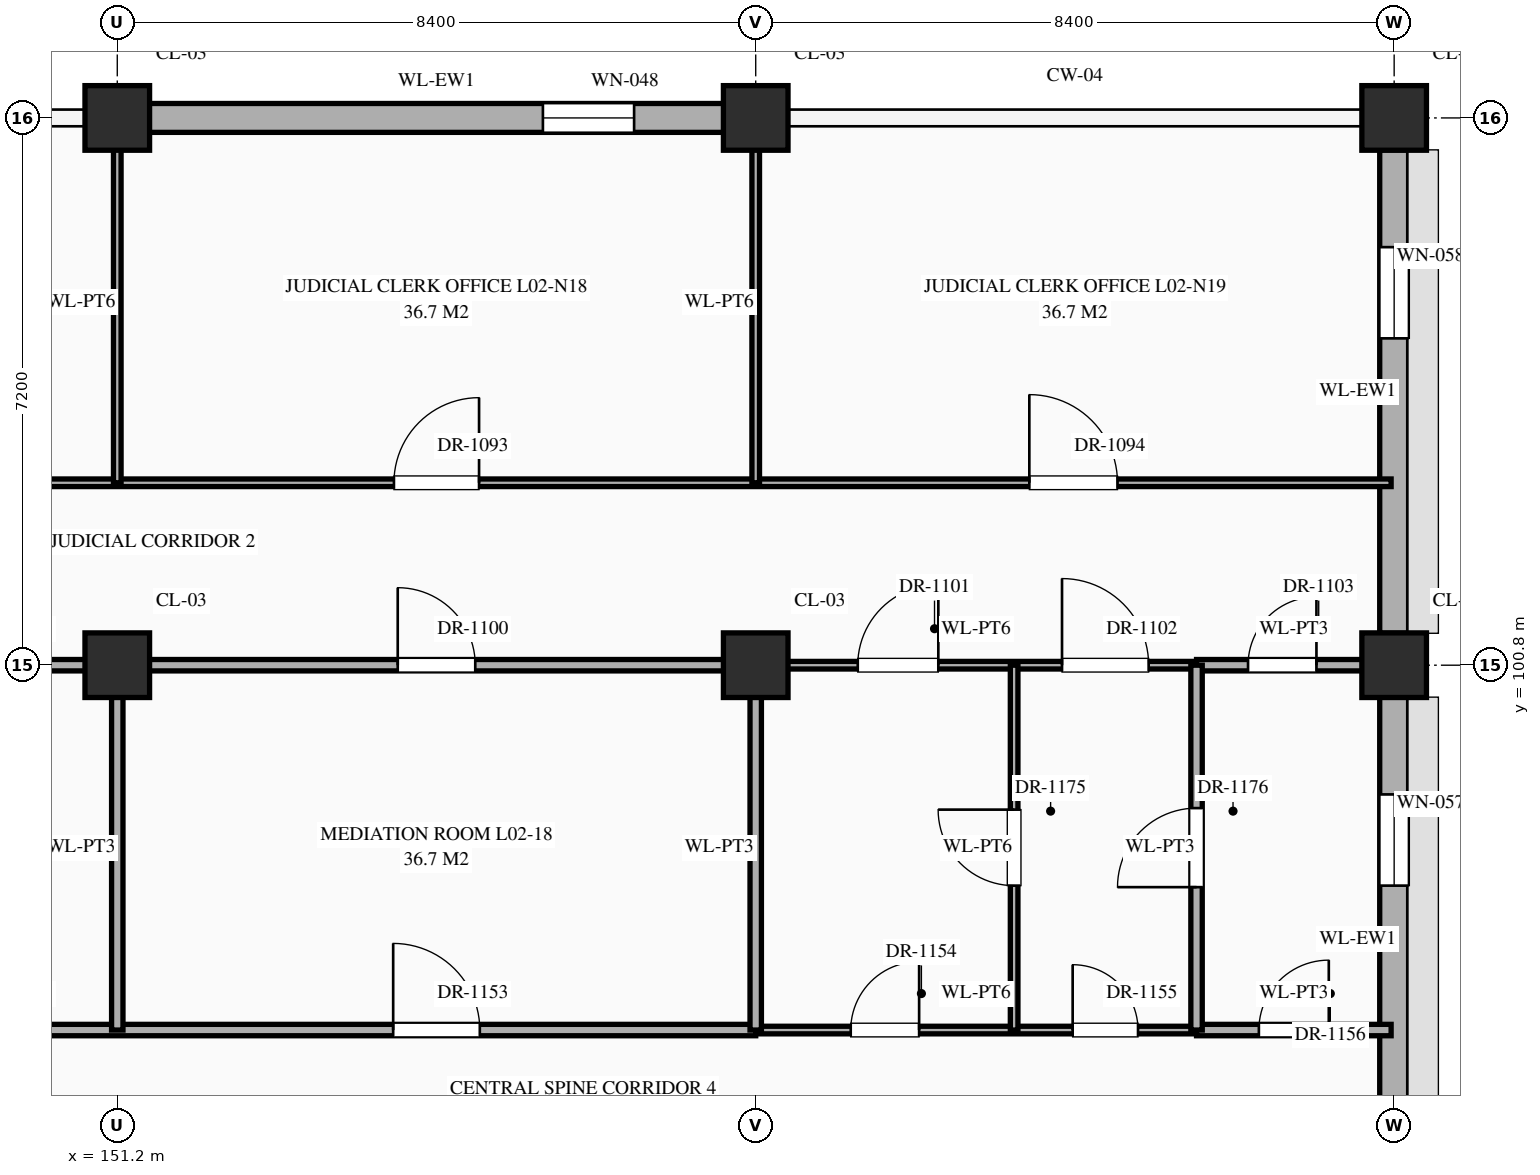
"""IFC4 building model, lengths in metres.
Left out: names, types, materials, properties, quantities, classifications, styles, units other than length and angle.
Written with IfcOpenShell. Run it as: python <this file> out.ifc"""

import sys

from ifc_helpers import new_model, si_unit, direction, frame, frame_2d, origin, origin_2d, place, context, subcontext, project, spatial, rectangle, extrude, element, fill, save


model = new_model("IFC4")
c1 = context("Model", 3, precision=1e-05, world=origin(), true_north=direction((0.0, 1.0)))
c2 = subcontext(c1, "Body", "Model", "MODEL_VIEW")
j1 = project(units=[si_unit("LENGTHUNIT", "METRE"), si_unit("PLANEANGLEUNIT", "RADIAN")], contexts=[c1])
p1 = place(None, origin())
s1 = spatial("IfcSite", under=j1, at=p1, CompositionType="ELEMENT")
p2 = place(p1, origin())
s2 = spatial("IfcBuilding", under=s1, at=p2, CompositionType="ELEMENT")
p3 = place(p2, frame((0.0, 0.0, 5.4)))
s3 = spatial("IfcBuildingStorey", under=s2, at=p3, CompositionType="ELEMENT", Elevation=5.4)
for number, where, z_axis, x_axis in (
    (1, (151.2, 100.8, 0.0), (0.0, 0.0, 1.0), (1.0, 0.0, 0.0)),
    (2, (151.2, 108.0, 0.0), (0.0, 0.0, 1.0), (1.0, 0.0, 0.0)),
    (3, (159.6, 100.8, 0.0), (0.0, 0.0, 1.0), (1.0, 0.0, 0.0)),
    (4, (159.6, 108.0, 0.0), (0.0, 0.0, 1.0), (1.0, 0.0, 0.0)),
    (5, (168.0, 100.8, 0.0), (0.0, 0.0, 1.0), (1.0, 0.0, 0.0)),
    (6, (168.0, 108.0, 0.0), (0.0, 0.0, 1.0), (1.0, 0.0, 0.0)),
):
    element("IfcColumn", number, at=place(p3, frame(where, z_axis=z_axis, x_axis=x_axis)), inside=s3, PredefinedType="COLUMN", context=c2, shape_type="SweptSolid", body=[
        extrude(rectangle(XDim=0.85, YDim=0.85, at=origin_2d()), origin(), (0.0, 0.0, 1.0), 5.4),
    ])
p4 = place(p3, frame((151.62, 108.0, 0.0), z_axis=(0.0, 0.0, 1.0), x_axis=(1.0, 0.0, 0.0)))
e7 = element("IfcWall", 7, at=p4, inside=s3, PredefinedType="STANDARD", context=c2, shape_type="SweptSolid", body=[
    extrude(rectangle(XDim=7.56, YDim=0.38, at=frame_2d((3.78, 0.0))), origin(), (0.0, 0.0, 1.0), 4.47),
])
p5 = place(p4, frame((5.18, 0.0, 0.85)))
e8 = element("IfcOpeningElement", 8, at=p5, cuts=e7, PredefinedType="OPENING", context=c2, shape_type="SweptSolid", body=[
    extrude(rectangle(XDim=1.2, YDim=1.92, at=frame_2d((0.6, 0.96))), frame((0.0, 0.202, 0.0), z_axis=(0.0, -1.0, 0.0), x_axis=(1.0, 0.0, 0.0)), (0.0, 0.0, 1.0), 0.404),
])
p6 = place(p3, frame((168.0, 94.02, 0.0), z_axis=(0.0, 0.0, 1.0), x_axis=(0.0, 1.0, 0.0)))
e9 = element("IfcWall", 9, at=p6, inside=s3, PredefinedType="STANDARD", context=c2, shape_type="SweptSolid", body=[
    extrude(rectangle(XDim=6.36, YDim=0.38, at=frame_2d((3.18, 0.0))), origin(), (0.0, 0.0, 1.0), 4.47),
])
p7 = place(p6, frame((3.88, 0.0, 0.85)))
e10 = element("IfcOpeningElement", 10, at=p7, cuts=e9, PredefinedType="OPENING", context=c2, shape_type="SweptSolid", body=[
    extrude(rectangle(XDim=1.2, YDim=1.38, at=frame_2d((0.6, 0.69))), frame((0.0, 0.202, 0.0), z_axis=(0.0, -1.0, 0.0), x_axis=(1.0, 0.0, 0.0)), (0.0, 0.0, 1.0), 0.404),
])
p8 = place(p3, frame((168.0, 101.22, 0.0), z_axis=(0.0, 0.0, 1.0), x_axis=(0.0, 1.0, 0.0)))
e11 = element("IfcWall", 11, at=p8, inside=s3, PredefinedType="STANDARD", context=c2, shape_type="SweptSolid", body=[
    extrude(rectangle(XDim=6.36, YDim=0.38, at=frame_2d((3.18, 0.0))), origin(), (0.0, 0.0, 1.0), 4.47),
])
p9 = place(p8, frame((3.88, 0.0, 0.85)))
e12 = element("IfcOpeningElement", 12, at=p9, cuts=e11, PredefinedType="OPENING", context=c2, shape_type="SweptSolid", body=[
    extrude(rectangle(XDim=1.2, YDim=1.56, at=frame_2d((0.6, 0.78))), frame((0.0, 0.202, 0.0), z_axis=(0.0, -1.0, 0.0), x_axis=(1.0, 0.0, 0.0)), (0.0, 0.0, 1.0), 0.404),
])
p10 = place(p3, frame((140.2, 96.0, 0.0), z_axis=(0.0, 0.0, 1.0), x_axis=(1.0, 0.0, 0.0)))
e13 = element("IfcWall", 13, at=p10, inside=s3, PredefinedType="STANDARD", context=c2, shape_type="SweptSolid", body=[
    extrude(rectangle(XDim=19.4, YDim=0.15, at=frame_2d((9.7, 0.0))), origin(), (0.0, 0.0, 1.0), 5.12),
])
p11 = place(p10, frame((0.79, 0.0, 0.0)))
e14 = element("IfcOpeningElement", 14, at=p11, cuts=e13, PredefinedType="OPENING", context=c2, shape_type="SweptSolid", body=[
    extrude(rectangle(XDim=1.02, YDim=2.4, at=frame_2d((0.51, 1.2))), frame((0.0, 0.087, 0.0), z_axis=(0.0, -1.0, 0.0), x_axis=(1.0, 0.0, 0.0)), (0.0, 0.0, 1.0), 0.174),
])
p12 = place(p10, frame((6.27, 0.0, 0.0)))
e15 = element("IfcOpeningElement", 15, at=p12, cuts=e13, PredefinedType="OPENING", context=c2, shape_type="SweptSolid", body=[
    extrude(rectangle(XDim=1.06, YDim=2.4, at=frame_2d((0.53, 1.2))), frame((0.0, 0.087, 0.0), z_axis=(0.0, -1.0, 0.0), x_axis=(1.0, 0.0, 0.0)), (0.0, 0.0, 1.0), 0.174),
])
p13 = place(p10, frame((14.63, 0.0, 0.0)))
e16 = element("IfcOpeningElement", 16, at=p13, cuts=e13, PredefinedType="OPENING", context=c2, shape_type="SweptSolid", body=[
    extrude(rectangle(XDim=1.14, YDim=2.4, at=frame_2d((0.57, 1.2))), frame((0.0, 0.087, 0.0), z_axis=(0.0, -1.0, 0.0), x_axis=(1.0, 0.0, 0.0)), (0.0, 0.0, 1.0), 0.174),
])
p14 = place(p3, frame((159.6, 96.0, 0.0), z_axis=(0.0, 0.0, 1.0), x_axis=(1.0, 0.0, 0.0)))
e17 = element("IfcWall", 17, at=p14, inside=s3, PredefinedType="STANDARD", context=c2, shape_type="SweptSolid", body=[
    extrude(rectangle(XDim=5.8, YDim=0.1, at=frame_2d((2.9, 0.0))), origin(), (0.0, 0.0, 1.0), 5.12),
])
p15 = place(p14, frame((1.25, 0.0, 0.0)))
e18 = element("IfcOpeningElement", 18, at=p15, cuts=e17, PredefinedType="OPENING", context=c2, shape_type="SweptSolid", body=[
    extrude(rectangle(XDim=0.9, YDim=2.15, at=frame_2d((0.45, 1.075))), frame((0.0, 0.062, 0.0), z_axis=(0.0, -1.0, 0.0), x_axis=(1.0, 0.0, 0.0)), (0.0, 0.0, 1.0), 0.124),
])
p16 = place(p14, frame((4.17, 0.0, 0.0)))
e19 = element("IfcOpeningElement", 19, at=p16, cuts=e17, PredefinedType="OPENING", context=c2, shape_type="SweptSolid", body=[
    extrude(rectangle(XDim=0.86, YDim=2.1, at=frame_2d((0.43, 1.05))), frame((0.0, 0.062, 0.0), z_axis=(0.0, -1.0, 0.0), x_axis=(1.0, 0.0, 0.0)), (0.0, 0.0, 1.0), 0.124),
])
p17 = place(p3, frame((165.4, 96.0, 0.0), z_axis=(0.0, 0.0, 1.0), x_axis=(1.0, 0.0, 0.0)))
e20 = element("IfcWall", 20, at=p17, inside=s3, PredefinedType="STANDARD", context=c2, shape_type="SweptSolid", body=[
    extrude(rectangle(XDim=2.56, YDim=0.15, at=frame_2d((1.28, 0.0))), origin(), (0.0, 0.0, 1.0), 5.12),
])
p18 = place(p17, frame((0.82, 0.0, 0.0)))
e21 = element("IfcOpeningElement", 21, at=p18, cuts=e20, PredefinedType="OPENING", context=c2, shape_type="SweptSolid", body=[
    extrude(rectangle(XDim=0.92, YDim=2.15, at=frame_2d((0.46, 1.075))), frame((0.0, 0.087, 0.0), z_axis=(0.0, -1.0, 0.0), x_axis=(1.0, 0.0, 0.0)), (0.0, 0.0, 1.0), 0.174),
])
p19 = place(p3, frame((140.2, 100.8, 0.0), z_axis=(0.0, 0.0, 1.0), x_axis=(1.0, 0.0, 0.0)))
e22 = element("IfcWall", 22, at=p19, inside=s3, PredefinedType="STANDARD", context=c2, shape_type="SweptSolid", body=[
    extrude(rectangle(XDim=19.4, YDim=0.15, at=frame_2d((9.7, 0.0))), origin(), (0.0, 0.0, 1.0), 4.27),
])
p20 = place(p19, frame((0.657, 0.0, 0.0)))
e23 = element("IfcOpeningElement", 23, at=p20, cuts=e22, PredefinedType="OPENING", context=c2, shape_type="SweptSolid", body=[
    extrude(rectangle(XDim=0.94, YDim=2.3, at=frame_2d((0.47, 1.15))), frame((0.0, 0.087, 0.0), z_axis=(0.0, -1.0, 0.0), x_axis=(1.0, 0.0, 0.0)), (0.0, 0.0, 1.0), 0.174),
])
p21 = place(p19, frame((6.31, 0.0, 0.0)))
e24 = element("IfcOpeningElement", 24, at=p21, cuts=e22, PredefinedType="OPENING", context=c2, shape_type="SweptSolid", body=[
    extrude(rectangle(XDim=0.98, YDim=2.35, at=frame_2d((0.49, 1.175))), frame((0.0, 0.087, 0.0), z_axis=(0.0, -1.0, 0.0), x_axis=(1.0, 0.0, 0.0)), (0.0, 0.0, 1.0), 0.174),
])
p22 = place(p19, frame((14.69, 0.0, 0.0)))
e25 = element("IfcOpeningElement", 25, at=p22, cuts=e22, PredefinedType="OPENING", context=c2, shape_type="SweptSolid", body=[
    extrude(rectangle(XDim=1.02, YDim=2.4, at=frame_2d((0.51, 1.2))), frame((0.0, 0.087, 0.0), z_axis=(0.0, -1.0, 0.0), x_axis=(1.0, 0.0, 0.0)), (0.0, 0.0, 1.0), 0.174),
])
p23 = place(p3, frame((159.6, 100.8, 0.0), z_axis=(0.0, 0.0, 1.0), x_axis=(1.0, 0.0, 0.0)))
e26 = element("IfcWall", 26, at=p23, inside=s3, PredefinedType="STANDARD", context=c2, shape_type="SweptSolid", body=[
    extrude(rectangle(XDim=5.8, YDim=0.1, at=frame_2d((2.9, 0.0))), origin(), (0.0, 0.0, 1.0), 4.27),
])
p24 = place(p23, frame((1.343, 0.0, 0.0)))
e27 = element("IfcOpeningElement", 27, at=p24, cuts=e26, PredefinedType="OPENING", context=c2, shape_type="SweptSolid", body=[
    extrude(rectangle(XDim=1.06, YDim=2.4, at=frame_2d((0.53, 1.2))), frame((0.0, 0.062, 0.0), z_axis=(0.0, -1.0, 0.0), x_axis=(1.0, 0.0, 0.0)), (0.0, 0.0, 1.0), 0.124),
])
p25 = place(p23, frame((4.03, 0.0, 0.0)))
e28 = element("IfcOpeningElement", 28, at=p25, cuts=e26, PredefinedType="OPENING", context=c2, shape_type="SweptSolid", body=[
    extrude(rectangle(XDim=1.14, YDim=2.4, at=frame_2d((0.57, 1.2))), frame((0.0, 0.062, 0.0), z_axis=(0.0, -1.0, 0.0), x_axis=(1.0, 0.0, 0.0)), (0.0, 0.0, 1.0), 0.124),
])
p26 = place(p3, frame((165.4, 100.8, 0.0), z_axis=(0.0, 0.0, 1.0), x_axis=(1.0, 0.0, 0.0)))
e29 = element("IfcWall", 29, at=p26, inside=s3, PredefinedType="STANDARD", context=c2, shape_type="SweptSolid", body=[
    extrude(rectangle(XDim=2.56, YDim=0.15, at=frame_2d((1.28, 0.0))), origin(), (0.0, 0.0, 1.0), 4.27),
])
p27 = place(p26, frame((0.677, 0.0, 0.0)))
e30 = element("IfcOpeningElement", 30, at=p27, cuts=e29, PredefinedType="OPENING", context=c2, shape_type="SweptSolid", body=[
    extrude(rectangle(XDim=0.9, YDim=2.15, at=frame_2d((0.45, 1.075))), frame((0.0, 0.087, 0.0), z_axis=(0.0, -1.0, 0.0), x_axis=(1.0, 0.0, 0.0)), (0.0, 0.0, 1.0), 0.174),
])
p28 = place(p3, frame((126.0, 103.2, 0.0), z_axis=(0.0, 0.0, 1.0), x_axis=(1.0, 0.0, 0.0)))
e31 = element("IfcWall", 31, at=p28, inside=s3, PredefinedType="STANDARD", context=c2, shape_type="SweptSolid", body=[
    extrude(rectangle(XDim=41.96, YDim=0.1, at=frame_2d((20.98, 0.0))), origin(), (0.0, 0.0, 1.0), 5.12),
])
p29 = place(p28, frame((3.7, 0.0, 0.0)))
e32 = element("IfcOpeningElement", 32, at=p29, cuts=e31, PredefinedType="OPENING", context=c2, shape_type="SweptSolid", body=[
    extrude(rectangle(XDim=1.0, YDim=2.25, at=frame_2d((0.5, 1.125))), frame((0.0, 0.062, 0.0), z_axis=(0.0, -1.0, 0.0), x_axis=(1.0, 0.0, 0.0)), (0.0, 0.0, 1.0), 0.124),
])
p30 = place(p28, frame((12.08, 0.0, 0.0)))
e33 = element("IfcOpeningElement", 33, at=p30, cuts=e31, PredefinedType="OPENING", context=c2, shape_type="SweptSolid", body=[
    extrude(rectangle(XDim=1.04, YDim=2.2, at=frame_2d((0.52, 1.1))), frame((0.0, 0.062, 0.0), z_axis=(0.0, -1.0, 0.0), x_axis=(1.0, 0.0, 0.0)), (0.0, 0.0, 1.0), 0.124),
])
p31 = place(p28, frame((20.46, 0.0, 0.0)))
e34 = element("IfcOpeningElement", 34, at=p31, cuts=e31, PredefinedType="OPENING", context=c2, shape_type="SweptSolid", body=[
    extrude(rectangle(XDim=1.08, YDim=2.25, at=frame_2d((0.54, 1.125))), frame((0.0, 0.062, 0.0), z_axis=(0.0, -1.0, 0.0), x_axis=(1.0, 0.0, 0.0)), (0.0, 0.0, 1.0), 0.124),
])
p32 = place(p28, frame((28.84, 0.0, 0.0)))
e35 = element("IfcOpeningElement", 35, at=p32, cuts=e31, PredefinedType="OPENING", context=c2, shape_type="SweptSolid", body=[
    extrude(rectangle(XDim=1.12, YDim=2.25, at=frame_2d((0.56, 1.125))), frame((0.0, 0.062, 0.0), z_axis=(0.0, -1.0, 0.0), x_axis=(1.0, 0.0, 0.0)), (0.0, 0.0, 1.0), 0.124),
])
p33 = place(p28, frame((37.2, 0.0, 0.0)))
e36 = element("IfcOpeningElement", 36, at=p33, cuts=e31, PredefinedType="OPENING", context=c2, shape_type="SweptSolid", body=[
    extrude(rectangle(XDim=1.16, YDim=2.3, at=frame_2d((0.58, 1.15))), frame((0.0, 0.062, 0.0), z_axis=(0.0, -1.0, 0.0), x_axis=(1.0, 0.0, 0.0)), (0.0, 0.0, 1.0), 0.124),
])
p34 = place(p3, frame((151.2, 96.0, 0.0), z_axis=(0.0, 0.0, 1.0), x_axis=(0.0, 1.0, 0.0)))
e37 = element("IfcWall", 37, at=p34, inside=s3, PredefinedType="STANDARD", context=c2, shape_type="SweptSolid", body=[
    extrude(rectangle(XDim=4.8, YDim=0.15, at=frame_2d((2.4, 0.0))), origin(), (0.0, 0.0, 1.0), 4.37),
])
p35 = place(p3, frame((151.2, 103.2, 0.0), z_axis=(0.0, 0.0, 1.0), x_axis=(0.0, 1.0, 0.0)))
e38 = element("IfcWall", 38, at=p35, inside=s3, PredefinedType="STANDARD", context=c2, shape_type="SweptSolid", body=[
    extrude(rectangle(XDim=4.76, YDim=0.1, at=frame_2d((2.38, 0.0))), origin(), (0.0, 0.0, 1.0), 4.37),
])
p36 = place(p3, frame((159.6, 96.0, 0.0), z_axis=(0.0, 0.0, 1.0), x_axis=(0.0, 1.0, 0.0)))
e39 = element("IfcWall", 39, at=p36, inside=s3, PredefinedType="STANDARD", context=c2, shape_type="SweptSolid", body=[
    extrude(rectangle(XDim=4.8, YDim=0.15, at=frame_2d((2.4, 0.0))), origin(), (0.0, 0.0, 1.0), 4.37),
])
p37 = place(p3, frame((159.6, 103.2, 0.0), z_axis=(0.0, 0.0, 1.0), x_axis=(0.0, 1.0, 0.0)))
e40 = element("IfcWall", 40, at=p37, inside=s3, PredefinedType="STANDARD", context=c2, shape_type="SweptSolid", body=[
    extrude(rectangle(XDim=4.76, YDim=0.1, at=frame_2d((2.38, 0.0))), origin(), (0.0, 0.0, 1.0), 4.37),
])
p38 = place(p3, frame((163.0, 96.0, 0.0), z_axis=(0.0, 0.0, 1.0), x_axis=(0.0, 1.0, 0.0)))
e41 = element("IfcWall", 41, at=p38, inside=s3, PredefinedType="STANDARD", context=c2, shape_type="SweptSolid", body=[
    extrude(rectangle(XDim=4.8, YDim=0.1, at=frame_2d((2.4, 0.0))), origin(), (0.0, 0.0, 1.0), 5.12),
])
p39 = place(p38, frame((1.9, 0.0, 0.0)))
e42 = element("IfcOpeningElement", 42, at=p39, cuts=e41, PredefinedType="OPENING", context=c2, shape_type="SweptSolid", body=[
    extrude(rectangle(XDim=1.0, YDim=2.25, at=frame_2d((0.5, 1.125))), frame((0.0, 0.062, 0.0), z_axis=(0.0, -1.0, 0.0), x_axis=(1.0, 0.0, 0.0)), (0.0, 0.0, 1.0), 0.124),
])
p40 = place(p3, frame((165.4, 96.0, 0.0), z_axis=(0.0, 0.0, 1.0), x_axis=(0.0, 1.0, 0.0)))
e43 = element("IfcWall", 43, at=p40, inside=s3, PredefinedType="STANDARD", context=c2, shape_type="SweptSolid", body=[
    extrude(rectangle(XDim=4.8, YDim=0.15, at=frame_2d((2.4, 0.0))), origin(), (0.0, 0.0, 1.0), 5.12),
])
p41 = place(p40, frame((1.88, 0.0, 0.0)))
e44 = element("IfcOpeningElement", 44, at=p41, cuts=e43, PredefinedType="OPENING", context=c2, shape_type="SweptSolid", body=[
    extrude(rectangle(XDim=1.04, YDim=2.2, at=frame_2d((0.52, 1.1))), frame((0.0, 0.087, 0.0), z_axis=(0.0, -1.0, 0.0), x_axis=(1.0, 0.0, 0.0)), (0.0, 0.0, 1.0), 0.174),
])
p42 = place(p5, origin())
e45 = element("IfcWindow", 45, at=p42, inside=s3, PartitioningType="SINGLE_PANEL", PredefinedType="WINDOW", context=c2, shape_type="SweptSolid", body=[
    extrude(rectangle(XDim=1.2, YDim=1.92, at=frame_2d((0.6, 0.96))), frame((0.0, 0.03, 0.0), z_axis=(0.0, -1.0, 0.0), x_axis=(1.0, 0.0, 0.0)), (0.0, 0.0, 1.0), 0.06),
])
fill(e8, e45)
p43 = place(p7, origin())
e46 = element("IfcWindow", 46, at=p43, inside=s3, PartitioningType="SINGLE_PANEL", PredefinedType="WINDOW", context=c2, shape_type="SweptSolid", body=[
    extrude(rectangle(XDim=1.2, YDim=1.38, at=frame_2d((0.6, 0.69))), frame((0.0, 0.03, 0.0), z_axis=(0.0, -1.0, 0.0), x_axis=(1.0, 0.0, 0.0)), (0.0, 0.0, 1.0), 0.06),
])
fill(e10, e46)
p44 = place(p9, origin())
e47 = element("IfcWindow", 47, at=p44, inside=s3, PartitioningType="SINGLE_PANEL", PredefinedType="WINDOW", context=c2, shape_type="SweptSolid", body=[
    extrude(rectangle(XDim=1.2, YDim=1.56, at=frame_2d((0.6, 0.78))), frame((0.0, 0.03, 0.0), z_axis=(0.0, -1.0, 0.0), x_axis=(1.0, 0.0, 0.0)), (0.0, 0.0, 1.0), 0.06),
])
fill(e12, e47)
p45 = place(p32, origin())
e48 = element("IfcDoor", 48, at=p45, inside=s3, OperationType="SINGLE_SWING_RIGHT", PredefinedType="DOOR", context=c2, shape_type="SweptSolid", body=[
    extrude(rectangle(XDim=1.12, YDim=2.25, at=frame_2d((0.56, 1.125))), frame((0.0, 0.025, 0.0), z_axis=(0.0, -1.0, 0.0), x_axis=(1.0, 0.0, 0.0)), (0.0, 0.0, 1.0), 0.05),
])
fill(e35, e48)
p46 = place(p33, origin())
e49 = element("IfcDoor", 49, at=p46, inside=s3, OperationType="SINGLE_SWING_LEFT", PredefinedType="DOOR", context=c2, shape_type="SweptSolid", body=[
    extrude(rectangle(XDim=1.16, YDim=2.3, at=frame_2d((0.58, 1.15))), frame((0.0, 0.025, 0.0), z_axis=(0.0, -1.0, 0.0), x_axis=(1.0, 0.0, 0.0)), (0.0, 0.0, 1.0), 0.05),
])
fill(e36, e49)
p47 = place(p22, origin())
e50 = element("IfcDoor", 50, at=p47, inside=s3, OperationType="SINGLE_SWING_LEFT", PredefinedType="DOOR", context=c2, shape_type="SweptSolid", body=[
    extrude(rectangle(XDim=1.02, YDim=2.4, at=frame_2d((0.51, 1.2))), frame((0.0, 0.025, 0.0), z_axis=(0.0, -1.0, 0.0), x_axis=(1.0, 0.0, 0.0)), (0.0, 0.0, 1.0), 0.05),
])
fill(e25, e50)
p48 = place(p24, origin())
e51 = element("IfcDoor", 51, at=p48, inside=s3, OperationType="SINGLE_SWING_RIGHT", PredefinedType="DOOR", context=c2, shape_type="SweptSolid", body=[
    extrude(rectangle(XDim=1.06, YDim=2.4, at=frame_2d((0.53, 1.2))), frame((0.0, 0.025, 0.0), z_axis=(0.0, -1.0, 0.0), x_axis=(1.0, 0.0, 0.0)), (0.0, 0.0, 1.0), 0.05),
])
fill(e27, e51)
p49 = place(p25, origin())
e52 = element("IfcDoor", 52, at=p49, inside=s3, OperationType="SINGLE_SWING_LEFT", PredefinedType="DOOR", context=c2, shape_type="SweptSolid", body=[
    extrude(rectangle(XDim=1.14, YDim=2.4, at=frame_2d((0.57, 1.2))), frame((0.0, 0.025, 0.0), z_axis=(0.0, -1.0, 0.0), x_axis=(1.0, 0.0, 0.0)), (0.0, 0.0, 1.0), 0.05),
])
fill(e28, e52)
p50 = place(p27, origin())
e53 = element("IfcDoor", 53, at=p50, inside=s3, OperationType="SINGLE_SWING_RIGHT", PredefinedType="DOOR", context=c2, shape_type="SweptSolid", body=[
    extrude(rectangle(XDim=0.9, YDim=2.15, at=frame_2d((0.45, 1.075))), frame((0.0, 0.025, 0.0), z_axis=(0.0, -1.0, 0.0), x_axis=(1.0, 0.0, 0.0)), (0.0, 0.0, 1.0), 0.05),
])
fill(e30, e53)
p51 = place(p13, origin())
e54 = element("IfcDoor", 54, at=p51, inside=s3, OperationType="SINGLE_SWING_LEFT", PredefinedType="DOOR", context=c2, shape_type="SweptSolid", body=[
    extrude(rectangle(XDim=1.14, YDim=2.4, at=frame_2d((0.57, 1.2))), frame((0.0, 0.025, 0.0), z_axis=(0.0, -1.0, 0.0), x_axis=(1.0, 0.0, 0.0)), (0.0, 0.0, 1.0), 0.05),
])
fill(e16, e54)
p52 = place(p15, origin())
e55 = element("IfcDoor", 55, at=p52, inside=s3, OperationType="SINGLE_SWING_RIGHT", PredefinedType="DOOR", context=c2, shape_type="SweptSolid", body=[
    extrude(rectangle(XDim=0.9, YDim=2.15, at=frame_2d((0.45, 1.075))), frame((0.0, 0.025, 0.0), z_axis=(0.0, -1.0, 0.0), x_axis=(1.0, 0.0, 0.0)), (0.0, 0.0, 1.0), 0.05),
])
fill(e18, e55)
p53 = place(p16, origin())
e56 = element("IfcDoor", 56, at=p53, inside=s3, OperationType="SINGLE_SWING_LEFT", PredefinedType="DOOR", context=c2, shape_type="SweptSolid", body=[
    extrude(rectangle(XDim=0.86, YDim=2.1, at=frame_2d((0.43, 1.05))), frame((0.0, 0.025, 0.0), z_axis=(0.0, -1.0, 0.0), x_axis=(1.0, 0.0, 0.0)), (0.0, 0.0, 1.0), 0.05),
])
fill(e19, e56)
p54 = place(p18, origin())
e57 = element("IfcDoor", 57, at=p54, inside=s3, OperationType="SINGLE_SWING_RIGHT", PredefinedType="DOOR", context=c2, shape_type="SweptSolid", body=[
    extrude(rectangle(XDim=0.92, YDim=2.15, at=frame_2d((0.46, 1.075))), frame((0.0, 0.025, 0.0), z_axis=(0.0, -1.0, 0.0), x_axis=(1.0, 0.0, 0.0)), (0.0, 0.0, 1.0), 0.05),
])
fill(e21, e57)
p55 = place(p39, origin())
e58 = element("IfcDoor", 58, at=p55, inside=s3, OperationType="SINGLE_SWING_RIGHT", PredefinedType="DOOR", context=c2, shape_type="SweptSolid", body=[
    extrude(rectangle(XDim=1.0, YDim=2.25, at=frame_2d((0.5, 1.125))), frame((0.0, 0.025, 0.0), z_axis=(0.0, -1.0, 0.0), x_axis=(1.0, 0.0, 0.0)), (0.0, 0.0, 1.0), 0.05),
])
fill(e42, e58)
p56 = place(p41, origin())
e59 = element("IfcDoor", 59, at=p56, inside=s3, OperationType="SINGLE_SWING_LEFT", PredefinedType="DOOR", context=c2, shape_type="SweptSolid", body=[
    extrude(rectangle(XDim=1.04, YDim=2.2, at=frame_2d((0.52, 1.1))), frame((0.0, 0.025, 0.0), z_axis=(0.0, -1.0, 0.0), x_axis=(1.0, 0.0, 0.0)), (0.0, 0.0, 1.0), 0.05),
])
fill(e44, e59)
save(model, sys.argv[1])
